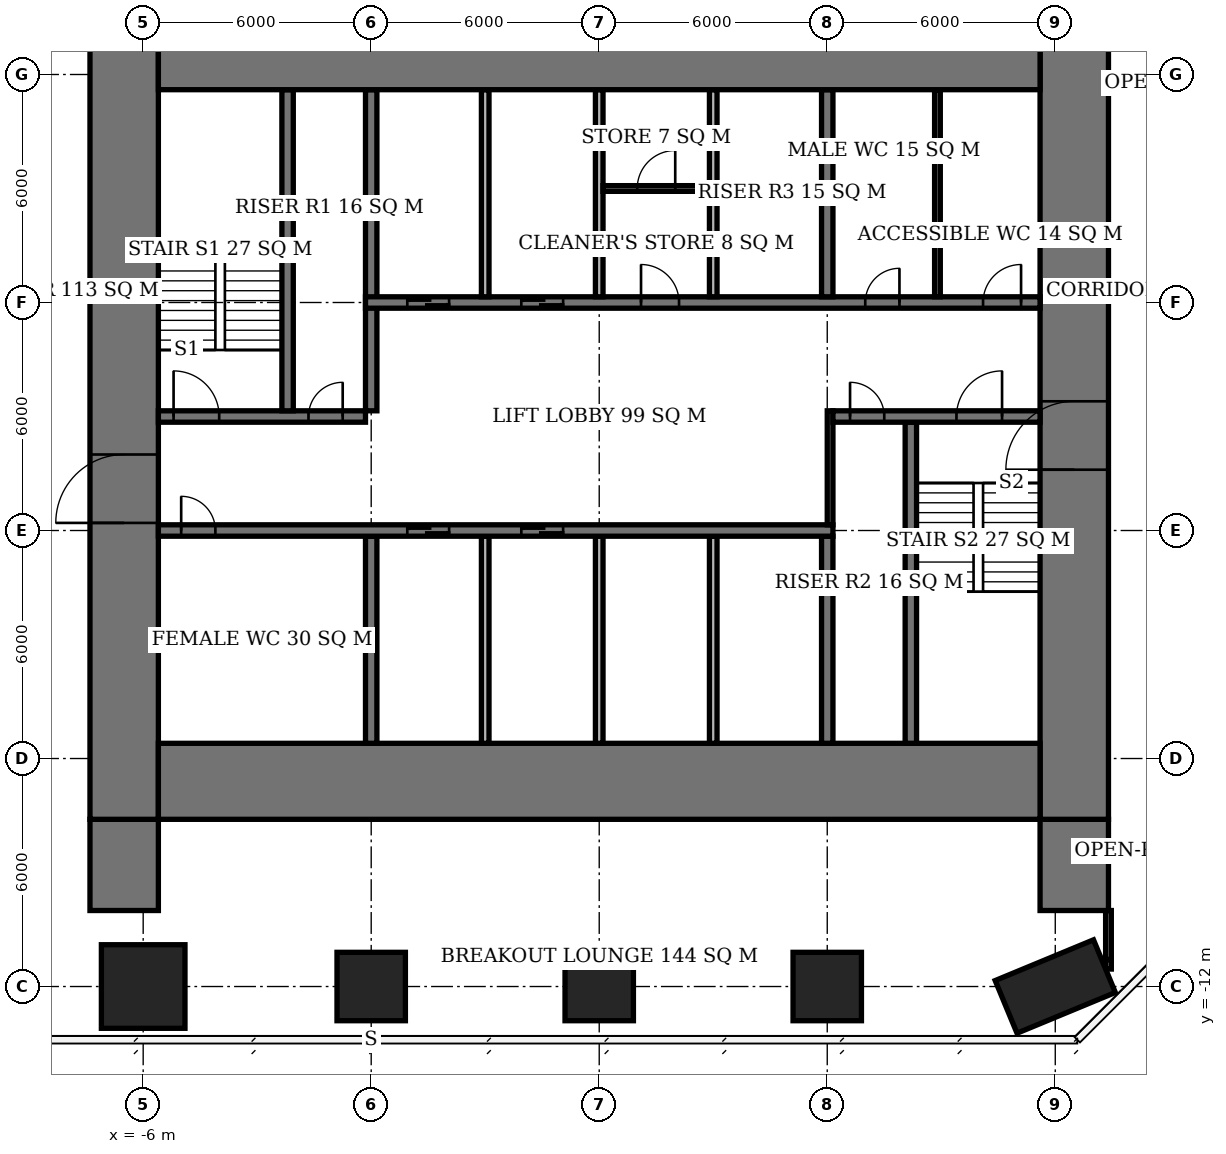
"""IFC4 building model, lengths in metres.
Left out: names, types, materials, properties, quantities, classifications, styles, units other than length and angle.
Written with IfcOpenShell. Run it as: python <this file> out.ifc"""

import sys

from ifc_helpers import new_model, si_unit, direction, frame, frame_2d, origin, origin_2d, place, context, subcontext, project, spatial, rectangle, extrude, element, fill, save


model = new_model("IFC4")
c1 = context("Model", 3, precision=1e-05, world=origin(), true_north=direction((0.0, 1.0)))
c2 = subcontext(c1, "Body", "Model", "MODEL_VIEW")
j1 = project(units=[si_unit("LENGTHUNIT", "METRE"), si_unit("PLANEANGLEUNIT", "RADIAN")], contexts=[c1])
p1 = place(None, origin())
s1 = spatial("IfcSite", under=j1, at=p1, CompositionType="ELEMENT")
p2 = place(p1, origin())
s2 = spatial("IfcBuilding", under=s1, at=p2, CompositionType="ELEMENT")
p3 = place(p2, frame((0.0, 0.0, 113.3)))
s3 = spatial("IfcBuildingStorey", under=s2, at=p3, CompositionType="ELEMENT", Elevation=113.3)
p4 = place(p3, frame((-6.0, -12.0, 0.0), z_axis=(0.0, 0.0, 1.0), x_axis=(1.0, 0.0, 0.0)))
e1 = element("IfcColumn", 1, at=p4, inside=s3, PredefinedType="COLUMN", context=c2, shape_type="SweptSolid", body=[
    extrude(rectangle(XDim=2.2, YDim=2.2, at=origin_2d()), origin(), (0.0, 0.0, 1.0), 3.9),
])
for number, where, z_axis, x_axis in (
    (2, (0.0, -12.0, 0.0), (0.0, 0.0, 1.0), (1.0, 0.0, 0.0)),
    (3, (6.0, -12.0, 0.0), (0.0, 0.0, 1.0), (1.0, 0.0, 0.0)),
    (4, (12.0, -12.0, 0.0), (0.0, 0.0, 1.0), (1.0, 0.0, 0.0)),
):
    element("IfcColumn", number, at=place(p3, frame(where, z_axis=z_axis, x_axis=x_axis)), inside=s3, PredefinedType="COLUMN", context=c2, shape_type="SweptSolid", body=[
        extrude(rectangle(XDim=1.8, YDim=1.8, at=origin_2d()), origin(), (0.0, 0.0, 1.0), 3.9),
    ])
p5 = place(p3, frame((18.0, -12.0, 0.0), z_axis=(0.0, 0.0, 1.0), x_axis=(-0.923879532511, -0.382683432365, 0.0)))
e5 = element("IfcColumn", 5, at=p5, inside=s3, PredefinedType="COLUMN", context=c2, shape_type="SweptSolid", body=[
    extrude(rectangle(XDim=2.8, YDim=1.5, at=origin_2d()), origin(), (0.0, 0.0, 1.0), 3.9),
])
for number, where, z_axis, x_axis in (
    (6, (-5.6, -6.6, 0.0), (0.0, 0.0, 1.0), (1.0, 0.0, 0.0)),
    (7, (-5.6, 12.6, 0.0), (0.0, 0.0, 1.0), (1.0, 0.0, 0.0)),
):
    element("IfcWall", number, at=place(p3, frame(where, z_axis=z_axis, x_axis=x_axis)), inside=s3, PredefinedType="SHEAR", context=c2, shape_type="SweptSolid", body=[
        extrude(rectangle(XDim=23.2, YDim=2.0, at=frame_2d((11.6, 0.0))), origin(), (0.0, 0.0, 1.0), 3.9),
    ])
p6 = place(p3, frame((-6.5, -7.6, 0.0), z_axis=(0.0, 0.0, 1.0), x_axis=(0.0, 1.0, 0.0)))
e8 = element("IfcWall", 8, at=p6, inside=s3, PredefinedType="SHEAR", context=c2, shape_type="SweptSolid", body=[
    extrude(rectangle(XDim=21.2, YDim=1.8, at=frame_2d((10.6, 0.0))), origin(), (0.0, 0.0, 1.0), 3.9),
])
p7 = place(p6, frame((7.8, 0.0, 0.0)))
e9 = element("IfcOpeningElement", 9, at=p7, cuts=e8, PredefinedType="OPENING", context=c2, shape_type="SweptSolid", body=[
    extrude(rectangle(XDim=1.8, YDim=2.4, at=frame_2d((0.9, 1.2))), frame((0.0, 0.91, 0.0), z_axis=(0.0, -1.0, 0.0), x_axis=(1.0, 0.0, 0.0)), (0.0, 0.0, 1.0), 1.82),
])
p8 = place(p3, frame((18.5, -7.6, 0.0), z_axis=(0.0, 0.0, 1.0), x_axis=(0.0, 1.0, 0.0)))
e10 = element("IfcWall", 10, at=p8, inside=s3, PredefinedType="SHEAR", context=c2, shape_type="SweptSolid", body=[
    extrude(rectangle(XDim=21.2, YDim=1.8, at=frame_2d((10.6, 0.0))), origin(), (0.0, 0.0, 1.0), 3.9),
])
p9 = place(p8, frame((9.2, 0.0, 0.0)))
e11 = element("IfcOpeningElement", 11, at=p9, cuts=e10, PredefinedType="OPENING", context=c2, shape_type="SweptSolid", body=[
    extrude(rectangle(XDim=1.8, YDim=2.4, at=frame_2d((0.9, 1.2))), frame((0.0, 0.91, 0.0), z_axis=(0.0, -1.0, 0.0), x_axis=(1.0, 0.0, 0.0)), (0.0, 0.0, 1.0), 1.82),
])
for number, where, z_axis, x_axis in (
    (12, (-6.5, -10.0, 0.0), (0.0, 0.0, 1.0), (0.0, 1.0, 0.0)),
    (13, (18.5, -10.0, 0.0), (0.0, 0.0, 1.0), (0.0, 1.0, 0.0)),
):
    element("IfcWall", number, at=place(p3, frame(where, z_axis=z_axis, x_axis=x_axis)), inside=s3, PredefinedType="SHEAR", context=c2, shape_type="SweptSolid", body=[
        extrude(rectangle(XDim=2.4, YDim=1.8, at=frame_2d((1.2, 0.0))), origin(), (0.0, 0.0, 1.0), 3.9),
    ])
p10 = place(p3, frame((-5.6, 0.0, 0.0), z_axis=(0.0, 0.0, 1.0), x_axis=(1.0, 0.0, 0.0)))
e14 = element("IfcWall", 14, at=p10, inside=s3, PredefinedType="SHEAR", context=c2, shape_type="SweptSolid", body=[
    extrude(rectangle(XDim=17.75, YDim=0.3, at=frame_2d((8.875, 0.0))), origin(), (0.0, 0.0, 1.0), 3.9),
])
p11 = place(p10, frame((0.6, 0.0, 0.0)))
e15 = element("IfcOpeningElement", 15, at=p11, cuts=e14, PredefinedType="OPENING", context=c2, shape_type="SweptSolid", body=[
    extrude(rectangle(XDim=0.9, YDim=2.1, at=frame_2d((0.45, 1.05))), frame((0.0, 0.16, 0.0), z_axis=(0.0, -1.0, 0.0), x_axis=(1.0, 0.0, 0.0)), (0.0, 0.0, 1.0), 0.32),
])
p12 = place(p10, frame((6.55, 0.0, 0.0)))
e16 = element("IfcOpeningElement", 16, at=p12, cuts=e14, PredefinedType="OPENING", context=c2, shape_type="SweptSolid", body=[
    extrude(rectangle(XDim=1.1, YDim=2.1, at=frame_2d((0.55, 1.05))), frame((0.0, 0.16, 0.0), z_axis=(0.0, -1.0, 0.0), x_axis=(1.0, 0.0, 0.0)), (0.0, 0.0, 1.0), 0.32),
])
p13 = place(p10, frame((9.55, 0.0, 0.0)))
e17 = element("IfcOpeningElement", 17, at=p13, cuts=e14, PredefinedType="OPENING", context=c2, shape_type="SweptSolid", body=[
    extrude(rectangle(XDim=1.1, YDim=2.1, at=frame_2d((0.55, 1.05))), frame((0.0, 0.16, 0.0), z_axis=(0.0, -1.0, 0.0), x_axis=(1.0, 0.0, 0.0)), (0.0, 0.0, 1.0), 0.32),
])
p14 = place(p3, frame((-5.6, 3.0, 0.0), z_axis=(0.0, 0.0, 1.0), x_axis=(1.0, 0.0, 0.0)))
e18 = element("IfcWall", 18, at=p14, inside=s3, PredefinedType="SHEAR", context=c2, shape_type="SweptSolid", body=[
    extrude(rectangle(XDim=5.45, YDim=0.3, at=frame_2d((2.725, 0.0))), origin(), (0.0, 0.0, 1.0), 3.9),
])
p15 = place(p14, frame((0.4, 0.0, 0.0)))
e19 = element("IfcOpeningElement", 19, at=p15, cuts=e18, PredefinedType="OPENING", context=c2, shape_type="SweptSolid", body=[
    extrude(rectangle(XDim=1.2, YDim=2.1, at=frame_2d((0.6, 1.05))), frame((0.0, 0.16, 0.0), z_axis=(0.0, -1.0, 0.0), x_axis=(1.0, 0.0, 0.0)), (0.0, 0.0, 1.0), 0.32),
])
p16 = place(p14, frame((3.95, 0.0, 0.0)))
e20 = element("IfcOpeningElement", 20, at=p16, cuts=e18, PredefinedType="OPENING", context=c2, shape_type="SweptSolid", body=[
    extrude(rectangle(XDim=0.9, YDim=2.1, at=frame_2d((0.45, 1.05))), frame((0.0, 0.16, 0.0), z_axis=(0.0, -1.0, 0.0), x_axis=(1.0, 0.0, 0.0)), (0.0, 0.0, 1.0), 0.32),
])
p17 = place(p3, frame((12.15, 3.0, 0.0), z_axis=(0.0, 0.0, 1.0), x_axis=(1.0, 0.0, 0.0)))
e21 = element("IfcWall", 21, at=p17, inside=s3, PredefinedType="SHEAR", context=c2, shape_type="SweptSolid", body=[
    extrude(rectangle(XDim=5.45, YDim=0.3, at=frame_2d((2.725, 0.0))), origin(), (0.0, 0.0, 1.0), 3.9),
])
p18 = place(p17, frame((3.25, 0.0, 0.0)))
e22 = element("IfcOpeningElement", 22, at=p18, cuts=e21, PredefinedType="OPENING", context=c2, shape_type="SweptSolid", body=[
    extrude(rectangle(XDim=1.2, YDim=2.1, at=frame_2d((0.6, 1.05))), frame((0.0, 0.16, 0.0), z_axis=(0.0, -1.0, 0.0), x_axis=(1.0, 0.0, 0.0)), (0.0, 0.0, 1.0), 0.32),
])
p19 = place(p17, frame((0.45, 0.0, 0.0)))
e23 = element("IfcOpeningElement", 23, at=p19, cuts=e21, PredefinedType="OPENING", context=c2, shape_type="SweptSolid", body=[
    extrude(rectangle(XDim=0.9, YDim=2.1, at=frame_2d((0.45, 1.05))), frame((0.0, 0.16, 0.0), z_axis=(0.0, -1.0, 0.0), x_axis=(1.0, 0.0, 0.0)), (0.0, 0.0, 1.0), 0.32),
])
p20 = place(p3, frame((-0.15, 6.0, 0.0), z_axis=(0.0, 0.0, 1.0), x_axis=(1.0, 0.0, 0.0)))
e24 = element("IfcWall", 24, at=p20, inside=s3, PredefinedType="SHEAR", context=c2, shape_type="SweptSolid", body=[
    extrude(rectangle(XDim=17.75, YDim=0.3, at=frame_2d((8.875, 0.0))), origin(), (0.0, 0.0, 1.0), 3.9),
])
p21 = place(p20, frame((13.15, 0.0, 0.0)))
e25 = element("IfcOpeningElement", 25, at=p21, cuts=e24, PredefinedType="OPENING", context=c2, shape_type="SweptSolid", body=[
    extrude(rectangle(XDim=0.9, YDim=2.1, at=frame_2d((0.45, 1.05))), frame((0.0, 0.16, 0.0), z_axis=(0.0, -1.0, 0.0), x_axis=(1.0, 0.0, 0.0)), (0.0, 0.0, 1.0), 0.32),
])
p22 = place(p20, frame((16.25, 0.0, 0.0)))
e26 = element("IfcOpeningElement", 26, at=p22, cuts=e24, PredefinedType="OPENING", context=c2, shape_type="SweptSolid", body=[
    extrude(rectangle(XDim=1.0, YDim=2.1, at=frame_2d((0.5, 1.05))), frame((0.0, 0.16, 0.0), z_axis=(0.0, -1.0, 0.0), x_axis=(1.0, 0.0, 0.0)), (0.0, 0.0, 1.0), 0.32),
])
p23 = place(p20, frame((7.25, 0.0, 0.0)))
e27 = element("IfcOpeningElement", 27, at=p23, cuts=e24, PredefinedType="OPENING", context=c2, shape_type="SweptSolid", body=[
    extrude(rectangle(XDim=1.0, YDim=2.1, at=frame_2d((0.5, 1.05))), frame((0.0, 0.16, 0.0), z_axis=(0.0, -1.0, 0.0), x_axis=(1.0, 0.0, 0.0)), (0.0, 0.0, 1.0), 0.32),
])
p24 = place(p20, frame((1.1, 0.0, 0.0)))
e28 = element("IfcOpeningElement", 28, at=p24, cuts=e24, PredefinedType="OPENING", context=c2, shape_type="SweptSolid", body=[
    extrude(rectangle(XDim=1.1, YDim=2.1, at=frame_2d((0.55, 1.05))), frame((0.0, 0.16, 0.0), z_axis=(0.0, -1.0, 0.0), x_axis=(1.0, 0.0, 0.0)), (0.0, 0.0, 1.0), 0.32),
])
p25 = place(p20, frame((4.1, 0.0, 0.0)))
e29 = element("IfcOpeningElement", 29, at=p25, cuts=e24, PredefinedType="OPENING", context=c2, shape_type="SweptSolid", body=[
    extrude(rectangle(XDim=1.1, YDim=2.1, at=frame_2d((0.55, 1.05))), frame((0.0, 0.16, 0.0), z_axis=(0.0, -1.0, 0.0), x_axis=(1.0, 0.0, 0.0)), (0.0, 0.0, 1.0), 0.32),
])
p26 = place(p3, frame((0.0, -5.6, 0.0), z_axis=(0.0, 0.0, 1.0), x_axis=(0.0, 1.0, 0.0)))
e30 = element("IfcWall", 30, at=p26, inside=s3, PredefinedType="SHEAR", context=c2, shape_type="SweptSolid", body=[
    extrude(rectangle(XDim=5.45, YDim=0.3, at=frame_2d((2.725, 0.0))), origin(), (0.0, 0.0, 1.0), 3.9),
])
p27 = place(p3, frame((0.0, 3.15, 0.0), z_axis=(0.0, 0.0, 1.0), x_axis=(0.0, 1.0, 0.0)))
e31 = element("IfcWall", 31, at=p27, inside=s3, PredefinedType="SHEAR", context=c2, shape_type="SweptSolid", body=[
    extrude(rectangle(XDim=8.45, YDim=0.3, at=frame_2d((4.225, 0.0))), origin(), (0.0, 0.0, 1.0), 3.9),
])
for number, where, z_axis, x_axis in (
    (32, (12.0, -5.6, 0.0), (0.0, 0.0, 1.0), (0.0, 1.0, 0.0)),
    (33, (12.0, 6.15, 0.0), (0.0, 0.0, 1.0), (0.0, 1.0, 0.0)),
):
    element("IfcWall", number, at=place(p3, frame(where, z_axis=z_axis, x_axis=x_axis)), inside=s3, PredefinedType="SHEAR", context=c2, shape_type="SweptSolid", body=[
        extrude(rectangle(XDim=5.45, YDim=0.3, at=frame_2d((2.725, 0.0))), origin(), (0.0, 0.0, 1.0), 3.9),
    ])
for number, where, z_axis, x_axis in (
    (34, (-2.2, 3.15, 0.0), (0.0, 0.0, 1.0), (0.0, 1.0, 0.0)),
    (35, (14.2, -5.6, 0.0), (0.0, 0.0, 1.0), (0.0, 1.0, 0.0)),
):
    element("IfcWall", number, at=place(p3, frame(where, z_axis=z_axis, x_axis=x_axis)), inside=s3, PredefinedType="SHEAR", context=c2, shape_type="SweptSolid", body=[
        extrude(rectangle(XDim=8.45, YDim=0.3, at=frame_2d((4.225, 0.0))), origin(), (0.0, 0.0, 1.0), 3.9),
    ])
for number, where, z_axis, x_axis in (
    (36, (3.0, 6.15, 0.0), (0.0, 0.0, 1.0), (0.0, 1.0, 0.0)),
    (37, (6.0, 6.15, 0.0), (0.0, 0.0, 1.0), (0.0, 1.0, 0.0)),
    (38, (9.0, 6.15, 0.0), (0.0, 0.0, 1.0), (0.0, 1.0, 0.0)),
    (39, (3.0, -5.6, 0.0), (0.0, 0.0, 1.0), (0.0, 1.0, 0.0)),
    (40, (6.0, -5.6, 0.0), (0.0, 0.0, 1.0), (0.0, 1.0, 0.0)),
    (41, (9.0, -5.6, 0.0), (0.0, 0.0, 1.0), (0.0, 1.0, 0.0)),
):
    element("IfcWall", number, at=place(p3, frame(where, z_axis=z_axis, x_axis=x_axis)), inside=s3, PredefinedType="SOLIDWALL", context=c2, shape_type="SweptSolid", body=[
        extrude(rectangle(XDim=5.45, YDim=0.2, at=frame_2d((2.725, 0.0))), origin(), (0.0, 0.0, 1.0), 3.9),
    ])
p28 = place(p3, frame((14.9, 6.15, 0.0), z_axis=(0.0, 0.0, 1.0), x_axis=(0.0, 1.0, 0.0)))
e42 = element("IfcWall", 42, at=p28, inside=s3, PredefinedType="PLUMBINGWALL", context=c2, shape_type="SweptSolid", body=[
    extrude(rectangle(XDim=5.45, YDim=0.15, at=frame_2d((2.725, 0.0))), origin(), (0.0, 0.0, 1.0), 3.65),
])
p29 = place(p3, frame((6.1, 9.0, 0.0), z_axis=(0.0, 0.0, 1.0), x_axis=(1.0, 0.0, 0.0)))
e43 = element("IfcWall", 43, at=p29, inside=s3, PredefinedType="PARTITIONING", context=c2, shape_type="SweptSolid", body=[
    extrude(rectangle(XDim=2.8, YDim=0.15, at=frame_2d((1.4, 0.0))), origin(), (0.0, 0.0, 1.0), 3.65),
])
p30 = place(p29, frame((0.9, 0.0, 0.0)))
e44 = element("IfcOpeningElement", 44, at=p30, cuts=e43, PredefinedType="OPENING", context=c2, shape_type="SweptSolid", body=[
    extrude(rectangle(XDim=1.0, YDim=2.1, at=frame_2d((0.5, 1.05))), frame((0.0, 0.085, 0.0), z_axis=(0.0, -1.0, 0.0), x_axis=(1.0, 0.0, 0.0)), (0.0, 0.0, 1.0), 0.17),
])
p31 = place(p3, frame((19.4, -11.541, 0.0), z_axis=(0.0, 0.0, 1.0), x_axis=(0.0, 1.0, 0.0)))
e45 = element("IfcWall", 45, at=p31, inside=s3, PredefinedType="PARTITIONING", context=c2, shape_type="SweptSolid", body=[
    extrude(rectangle(XDim=0.25, YDim=0.15, at=frame_2d((0.125, 0.0))), origin(), (0.0, 0.0, 1.0), 2.65),
])
p32 = place(p3, frame((19.4, -11.29, 0.0), z_axis=(0.0, 0.0, 1.0), x_axis=(0.0, 1.0, 0.0)))
e46 = element("IfcWall", 46, at=p32, inside=s3, PredefinedType="PARTITIONING", context=c2, shape_type="SweptSolid", body=[
    extrude(rectangle(XDim=1.29, YDim=0.15, at=frame_2d((0.645, 0.0))), origin(), (0.0, 0.0, 1.0), 3.65),
])
p33 = place(p3, frame((12.075, 0.15, 0.0), z_axis=(0.0, 0.0, 1.0), x_axis=(0.0, 1.0, 0.0)))
e47 = element("IfcWall", 47, at=p33, inside=s3, PredefinedType="PARTITIONING", context=c2, shape_type="SweptSolid", body=[
    extrude(rectangle(XDim=3.0, YDim=0.15, at=frame_2d((1.5, 0.0))), origin(), (0.0, 0.0, 1.0), 3.65),
])
p34 = place(p7, origin())
e48 = element("IfcDoor", 48, at=p34, inside=s3, OperationType="DOUBLE_DOOR_SINGLE_SWING", PredefinedType="DOOR", context=c2, shape_type="SweptSolid", body=[
    extrude(rectangle(XDim=1.8, YDim=2.4, at=frame_2d((0.9, 1.2))), frame((0.0, 0.025, 0.0), z_axis=(0.0, -1.0, 0.0), x_axis=(1.0, 0.0, 0.0)), (0.0, 0.0, 1.0), 0.05),
])
fill(e9, e48)
p35 = place(p9, origin())
e49 = element("IfcDoor", 49, at=p35, inside=s3, OperationType="DOUBLE_DOOR_SINGLE_SWING", PredefinedType="DOOR", context=c2, shape_type="SweptSolid", body=[
    extrude(rectangle(XDim=1.8, YDim=2.4, at=frame_2d((0.9, 1.2))), frame((0.0, 0.025, 0.0), z_axis=(0.0, -1.0, 0.0), x_axis=(1.0, 0.0, 0.0)), (0.0, 0.0, 1.0), 0.05),
])
fill(e11, e49)
p36 = place(p15, origin())
e50 = element("IfcDoor", 50, at=p36, inside=s3, OperationType="SINGLE_SWING_LEFT", PredefinedType="DOOR", context=c2, shape_type="SweptSolid", body=[
    extrude(rectangle(XDim=1.2, YDim=2.1, at=frame_2d((0.6, 1.05))), frame((0.0, 0.025, 0.0), z_axis=(0.0, -1.0, 0.0), x_axis=(1.0, 0.0, 0.0)), (0.0, 0.0, 1.0), 0.05),
])
fill(e19, e50)
p37 = place(p16, origin())
e51 = element("IfcDoor", 51, at=p37, inside=s3, OperationType="SINGLE_SWING_RIGHT", PredefinedType="DOOR", context=c2, shape_type="SweptSolid", body=[
    extrude(rectangle(XDim=0.9, YDim=2.1, at=frame_2d((0.45, 1.05))), frame((0.0, 0.025, 0.0), z_axis=(0.0, -1.0, 0.0), x_axis=(1.0, 0.0, 0.0)), (0.0, 0.0, 1.0), 0.05),
])
fill(e20, e51)
p38 = place(p18, origin())
e52 = element("IfcDoor", 52, at=p38, inside=s3, OperationType="SINGLE_SWING_RIGHT", PredefinedType="DOOR", context=c2, shape_type="SweptSolid", body=[
    extrude(rectangle(XDim=1.2, YDim=2.1, at=frame_2d((0.6, 1.05))), frame((0.0, 0.025, 0.0), z_axis=(0.0, -1.0, 0.0), x_axis=(1.0, 0.0, 0.0)), (0.0, 0.0, 1.0), 0.05),
])
fill(e22, e52)
p39 = place(p19, origin())
e53 = element("IfcDoor", 53, at=p39, inside=s3, OperationType="SINGLE_SWING_LEFT", PredefinedType="DOOR", context=c2, shape_type="SweptSolid", body=[
    extrude(rectangle(XDim=0.9, YDim=2.1, at=frame_2d((0.45, 1.05))), frame((0.0, 0.025, 0.0), z_axis=(0.0, -1.0, 0.0), x_axis=(1.0, 0.0, 0.0)), (0.0, 0.0, 1.0), 0.05),
])
fill(e23, e53)
p40 = place(p11, origin())
e54 = element("IfcDoor", 54, at=p40, inside=s3, OperationType="SINGLE_SWING_LEFT", PredefinedType="DOOR", context=c2, shape_type="SweptSolid", body=[
    extrude(rectangle(XDim=0.9, YDim=2.1, at=frame_2d((0.45, 1.05))), frame((0.0, 0.025, 0.0), z_axis=(0.0, -1.0, 0.0), x_axis=(1.0, 0.0, 0.0)), (0.0, 0.0, 1.0), 0.05),
])
fill(e15, e54)
p41 = place(p21, origin())
e55 = element("IfcDoor", 55, at=p41, inside=s3, OperationType="SINGLE_SWING_RIGHT", PredefinedType="DOOR", context=c2, shape_type="SweptSolid", body=[
    extrude(rectangle(XDim=0.9, YDim=2.1, at=frame_2d((0.45, 1.05))), frame((0.0, 0.025, 0.0), z_axis=(0.0, -1.0, 0.0), x_axis=(1.0, 0.0, 0.0)), (0.0, 0.0, 1.0), 0.05),
])
fill(e25, e55)
p42 = place(p22, origin())
e56 = element("IfcDoor", 56, at=p42, inside=s3, OperationType="SINGLE_SWING_RIGHT", PredefinedType="DOOR", context=c2, shape_type="SweptSolid", body=[
    extrude(rectangle(XDim=1.0, YDim=2.1, at=frame_2d((0.5, 1.05))), frame((0.0, 0.025, 0.0), z_axis=(0.0, -1.0, 0.0), x_axis=(1.0, 0.0, 0.0)), (0.0, 0.0, 1.0), 0.05),
])
fill(e26, e56)
p43 = place(p30, origin())
e57 = element("IfcDoor", 57, at=p43, inside=s3, OperationType="SINGLE_SWING_RIGHT", PredefinedType="DOOR", context=c2, shape_type="SweptSolid", body=[
    extrude(rectangle(XDim=1.0, YDim=2.1, at=frame_2d((0.5, 1.05))), frame((0.0, 0.025, 0.0), z_axis=(0.0, -1.0, 0.0), x_axis=(1.0, 0.0, 0.0)), (0.0, 0.0, 1.0), 0.05),
])
fill(e44, e57)
p44 = place(p23, origin())
e58 = element("IfcDoor", 58, at=p44, inside=s3, OperationType="SINGLE_SWING_LEFT", PredefinedType="DOOR", context=c2, shape_type="SweptSolid", body=[
    extrude(rectangle(XDim=1.0, YDim=2.1, at=frame_2d((0.5, 1.05))), frame((0.0, 0.025, 0.0), z_axis=(0.0, -1.0, 0.0), x_axis=(1.0, 0.0, 0.0)), (0.0, 0.0, 1.0), 0.05),
])
fill(e27, e58)
p45 = place(p24, origin())
e59 = element("IfcDoor", 59, at=p45, inside=s3, OperationType="DOUBLE_DOOR_SLIDING", PredefinedType="USERDEFINED", context=c2, shape_type="SweptSolid", body=[
    extrude(rectangle(XDim=1.1, YDim=2.1, at=frame_2d((0.55, 1.05))), frame((0.0, 0.025, 0.0), z_axis=(0.0, -1.0, 0.0), x_axis=(1.0, 0.0, 0.0)), (0.0, 0.0, 1.0), 0.05),
])
fill(e28, e59)
p46 = place(p25, origin())
e60 = element("IfcDoor", 60, at=p46, inside=s3, OperationType="DOUBLE_DOOR_SLIDING", PredefinedType="USERDEFINED", context=c2, shape_type="SweptSolid", body=[
    extrude(rectangle(XDim=1.1, YDim=2.1, at=frame_2d((0.55, 1.05))), frame((0.0, 0.025, 0.0), z_axis=(0.0, -1.0, 0.0), x_axis=(1.0, 0.0, 0.0)), (0.0, 0.0, 1.0), 0.05),
])
fill(e29, e60)
p47 = place(p12, origin())
e61 = element("IfcDoor", 61, at=p47, inside=s3, OperationType="DOUBLE_DOOR_SLIDING", PredefinedType="USERDEFINED", context=c2, shape_type="SweptSolid", body=[
    extrude(rectangle(XDim=1.1, YDim=2.1, at=frame_2d((0.55, 1.05))), frame((0.0, 0.025, 0.0), z_axis=(0.0, -1.0, 0.0), x_axis=(1.0, 0.0, 0.0)), (0.0, 0.0, 1.0), 0.05),
])
fill(e16, e61)
p48 = place(p13, origin())
e62 = element("IfcDoor", 62, at=p48, inside=s3, OperationType="DOUBLE_DOOR_SLIDING", PredefinedType="USERDEFINED", context=c2, shape_type="SweptSolid", body=[
    extrude(rectangle(XDim=1.1, YDim=2.1, at=frame_2d((0.55, 1.05))), frame((0.0, 0.025, 0.0), z_axis=(0.0, -1.0, 0.0), x_axis=(1.0, 0.0, 0.0)), (0.0, 0.0, 1.0), 0.05),
])
fill(e17, e62)
save(model, sys.argv[1])
